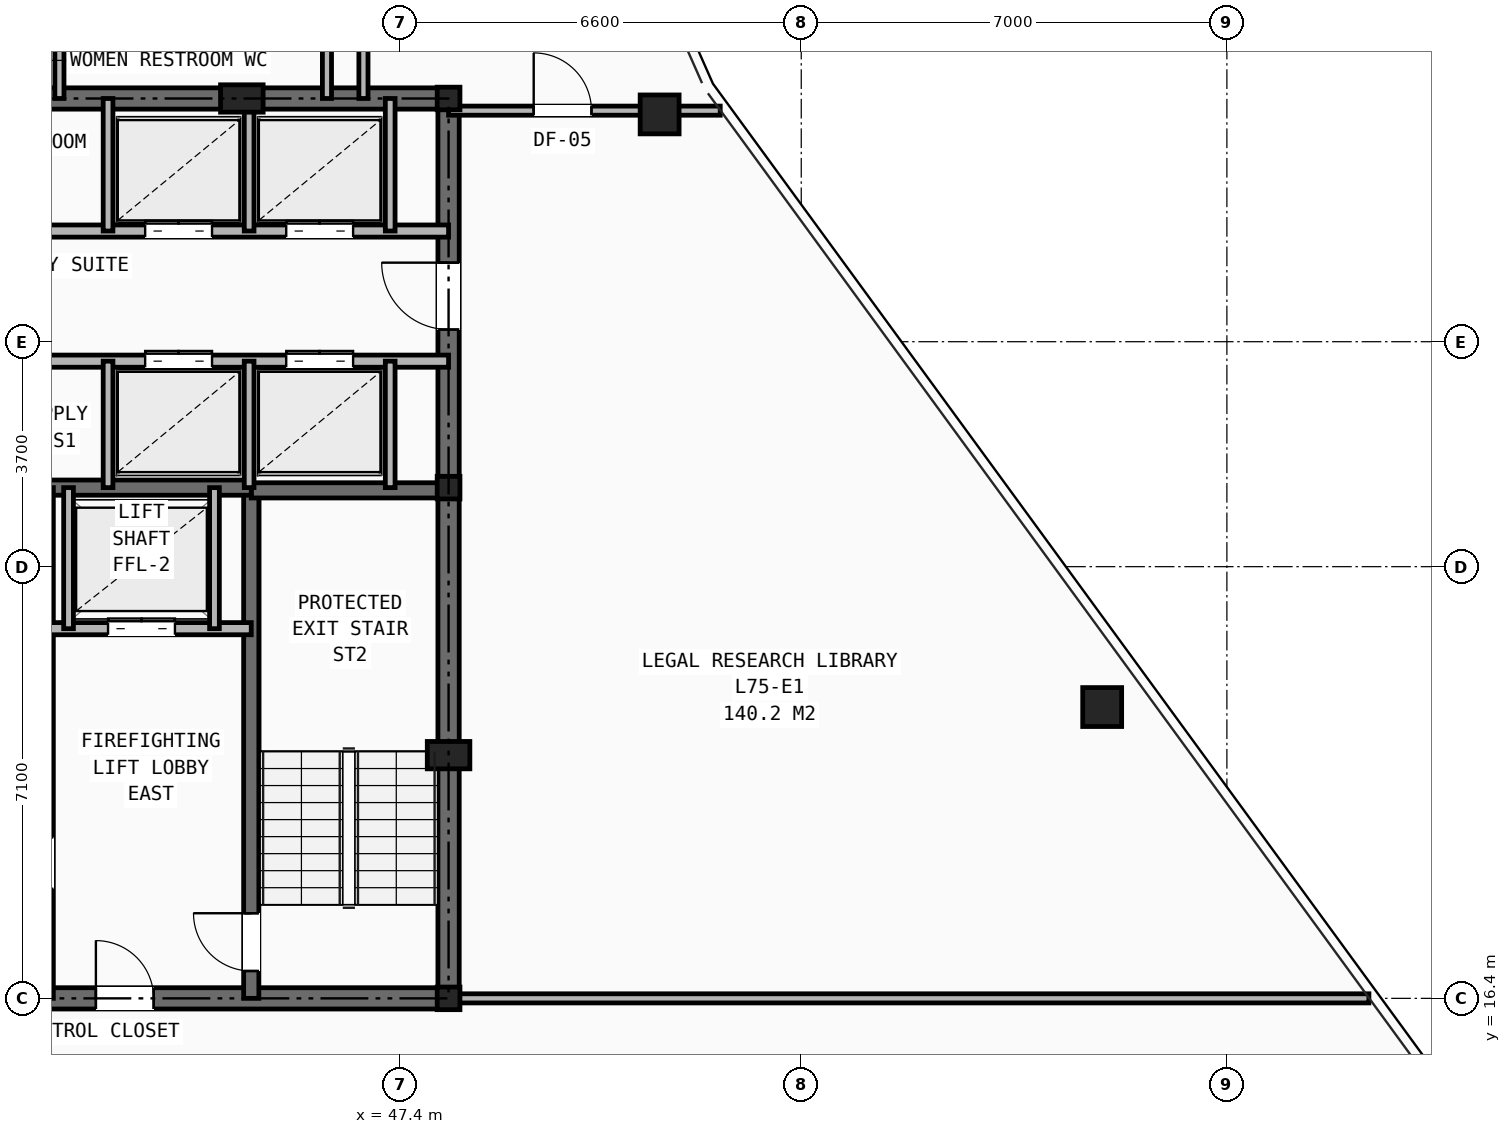
"""IFC4 building model, lengths in metres.
Left out: names, types, materials, properties, quantities, classifications, styles, units other than length and angle.
Written with IfcOpenShell. Run it as: python <this file> out.ifc"""

import sys

from ifc_helpers import new_model, si_unit, direction, frame, frame_2d, origin, origin_2d, place, context, subcontext, project, spatial, rectangle, hollow_rectangle, i_section, extrude, element, fill, save


model = new_model("IFC4")
c1 = context("Model", 3, precision=1e-05, world=origin(), true_north=direction((0.0, 1.0)))
c2 = subcontext(c1, "Body", "Model", "MODEL_VIEW")
j1 = project(units=[si_unit("LENGTHUNIT", "METRE"), si_unit("PLANEANGLEUNIT", "RADIAN")], contexts=[c1])
p1 = place(None, origin())
s1 = spatial("IfcSite", under=j1, at=p1, CompositionType="ELEMENT")
p2 = place(p1, origin())
s2 = spatial("IfcBuilding", under=s1, at=p2, CompositionType="ELEMENT")
p3 = place(p2, frame((0.0, 0.0, 265.5)))
s3 = spatial("IfcBuildingStorey", under=s2, at=p3, CompositionType="ELEMENT", Elevation=265.5)
for number, where, z_axis, x_axis in (
    (1, (48.2, 16.4, 0.0), (0.0, 0.0, 1.0), (1.0, 0.0, 0.0)),
    (2, (48.2, 24.8, 0.0), (0.0, 0.0, 1.0), (1.0, 0.0, 0.0)),
    (3, (48.2, 31.2, 0.0), (0.0, 0.0, 1.0), (1.0, 0.0, 0.0)),
):
    element("IfcColumn", number, at=place(p3, frame(where, z_axis=z_axis, x_axis=x_axis)), inside=s3, PredefinedType="COLUMN", context=c2, shape_type="SweptSolid", body=[
        extrude(i_section(OverallWidth=0.374, OverallDepth=0.372, WebThickness=0.016, FlangeThickness=0.026, at=origin_2d()), origin(), (0.0, 0.0, 1.0), 3.5),
    ])
for number, where, z_axis, x_axis in (
    (4, (48.2, 20.4, 0.0), (0.0, 0.0, 1.0), (1.0, 0.0, 0.0)),
    (5, (44.8, 31.2, 0.0), (0.0, 0.0, 1.0), (1.0, 0.0, 0.0)),
):
    element("IfcColumn", number, at=place(p3, frame(where, z_axis=z_axis, x_axis=x_axis)), inside=s3, PredefinedType="PILASTER", context=c2, shape_type="SweptSolid", body=[
        extrude(rectangle(XDim=0.7, YDim=0.45, at=origin_2d()), origin(), (0.0, 0.0, 1.0), 3.5),
    ])
for number, where, z_axis, x_axis in (
    (6, (58.949, 21.191, 0.0), (0.0, 0.0, 1.0), (1.0, 0.0, 0.0)),
    (7, (51.671, 30.938, 0.0), (0.0, 0.0, 1.0), (1.0, 0.0, 0.0)),
):
    element("IfcColumn", number, at=place(p3, frame(where, z_axis=z_axis, x_axis=x_axis)), inside=s3, PredefinedType="COLUMN", context=c2, shape_type="SweptSolid", body=[
        extrude(hollow_rectangle(XDim=0.64, YDim=0.64, WallThickness=0.045, at=origin_2d()), origin(), (0.0, 0.0, 1.0), 3.5),
    ])
p4 = place(p3, frame((31.8, 16.4, 0.0), z_axis=(0.0, 0.0, 1.0), x_axis=(1.0, 0.0, 0.0)))
e8 = element("IfcWall", 8, at=p4, inside=s3, PredefinedType="SHEAR", context=c2, shape_type="SweptSolid", body=[
    extrude(rectangle(XDim=16.4, YDim=0.35, at=frame_2d((8.2, 0.0))), origin(), (0.0, 0.0, 1.0), 3.25),
])
p5 = place(p4, frame((4.2, 0.0, 0.0)))
e9 = element("IfcOpeningElement", 9, at=p5, cuts=e8, PredefinedType="OPENING", context=c2, shape_type="SweptSolid", body=[
    extrude(rectangle(XDim=0.95, YDim=2.1, at=frame_2d((0.475, 1.05))), frame((0.0, 0.185, 0.0), z_axis=(0.0, -1.0, 0.0), x_axis=(1.0, 0.0, 0.0)), (0.0, 0.0, 1.0), 0.37),
])
p6 = place(p4, frame((10.6, 0.0, 0.0)))
e10 = element("IfcOpeningElement", 10, at=p6, cuts=e8, PredefinedType="OPENING", context=c2, shape_type="SweptSolid", body=[
    extrude(rectangle(XDim=0.95, YDim=2.1, at=frame_2d((0.475, 1.05))), frame((0.0, 0.185, 0.0), z_axis=(0.0, -1.0, 0.0), x_axis=(1.0, 0.0, 0.0)), (0.0, 0.0, 1.0), 0.37),
])
p7 = place(p3, frame((31.8, 31.2, 0.0), z_axis=(0.0, 0.0, 1.0), x_axis=(1.0, 0.0, 0.0)))
e11 = element("IfcWall", 11, at=p7, inside=s3, PredefinedType="SHEAR", context=c2, shape_type="SweptSolid", body=[
    extrude(rectangle(XDim=16.4, YDim=0.35, at=frame_2d((8.2, 0.0))), origin(), (0.0, 0.0, 1.0), 3.25),
])
p8 = place(p3, frame((48.2, 16.4, 0.0), z_axis=(0.0, 0.0, 1.0), x_axis=(0.0, 1.0, 0.0)))
e12 = element("IfcWall", 12, at=p8, inside=s3, PredefinedType="SHEAR", context=c2, shape_type="SweptSolid", body=[
    extrude(rectangle(XDim=14.8, YDim=0.35, at=frame_2d((7.4, 0.0))), origin(), (0.0, 0.0, 1.0), 3.25),
])
p9 = place(p8, frame((11.0, 0.0, 0.0)))
e13 = element("IfcOpeningElement", 13, at=p9, cuts=e12, PredefinedType="OPENING", context=c2, shape_type="SweptSolid", body=[
    extrude(rectangle(XDim=1.1, YDim=2.15, at=frame_2d((0.55, 1.075))), frame((0.0, 0.185, 0.0), z_axis=(0.0, -1.0, 0.0), x_axis=(1.0, 0.0, 0.0)), (0.0, 0.0, 1.0), 0.37),
])
p10 = place(p3, frame((44.955, 16.4, 0.0), z_axis=(0.0, 0.0, 1.0), x_axis=(0.0, 1.0, 0.0)))
e14 = element("IfcWall", 14, at=p10, inside=s3, PredefinedType="SHEAR", context=c2, shape_type="SweptSolid", body=[
    extrude(rectangle(XDim=8.4, YDim=0.25, at=frame_2d((4.2, 0.0))), origin(), (0.0, 0.0, 1.0), 3.25),
])
p11 = place(p10, frame((0.45, 0.0, 0.0)))
e15 = element("IfcOpeningElement", 15, at=p11, cuts=e14, PredefinedType="OPENING", context=c2, shape_type="SweptSolid", body=[
    extrude(rectangle(XDim=0.95, YDim=2.1, at=frame_2d((0.475, 1.05))), frame((0.0, 0.135, 0.0), z_axis=(0.0, -1.0, 0.0), x_axis=(1.0, 0.0, 0.0)), (0.0, 0.0, 1.0), 0.27),
])
p12 = place(p3, frame((44.955, 24.755, 0.0), z_axis=(0.0, 0.0, 1.0), x_axis=(1.0, 0.0, 0.0)))
e16 = element("IfcWall", 16, at=p12, inside=s3, PredefinedType="SHEAR", context=c2, shape_type="SweptSolid", body=[
    extrude(rectangle(XDim=3.245, YDim=0.25, at=frame_2d((1.623, 0.0))), origin(), (0.0, 0.0, 1.0), 3.25),
])
p13 = place(p3, frame((35.045, 24.8, 0.0), z_axis=(0.0, 0.0, 1.0), x_axis=(1.0, 0.0, 0.0)))
e17 = element("IfcWall", 17, at=p13, inside=s3, PredefinedType="SHEAR", context=c2, shape_type="SweptSolid", body=[
    extrude(rectangle(XDim=9.91, YDim=0.25, at=frame_2d((4.955, 0.0))), origin(), (0.0, 0.0, 1.0), 3.25),
])
p14 = place(p3, frame((41.61, 16.4, 0.0), z_axis=(0.0, 0.0, 1.0), x_axis=(0.0, 1.0, 0.0)))
e18 = element("IfcWall", 18, at=p14, inside=s3, PredefinedType="PARTITIONING", context=c2, shape_type="SweptSolid", body=[
    extrude(rectangle(XDim=8.4, YDim=0.18, at=frame_2d((4.2, 0.0))), origin(), (0.0, 0.0, 1.0), 2.978),
])
p15 = place(p14, frame((1.8, 0.0, 0.0)))
e19 = element("IfcOpeningElement", 19, at=p15, cuts=e18, PredefinedType="OPENING", context=c2, shape_type="SweptSolid", body=[
    extrude(rectangle(XDim=0.85, YDim=2.05, at=frame_2d((0.425, 1.025))), frame((0.0, 0.1, 0.0), z_axis=(0.0, -1.0, 0.0), x_axis=(1.0, 0.0, 0.0)), (0.0, 0.0, 1.0), 0.2),
])
p16 = place(p3, frame((35.045, 22.48, 0.0), z_axis=(0.0, 0.0, 1.0), x_axis=(1.0, 0.0, 0.0)))
e20 = element("IfcWall", 20, at=p16, inside=s3, PredefinedType="SOLIDWALL", context=c2, shape_type="SweptSolid", body=[
    extrude(rectangle(XDim=9.91, YDim=0.2, at=frame_2d((4.955, 0.0))), origin(), (0.0, 0.0, 1.0), 3.25),
])
p17 = place(p16, frame((1.255, 0.0, 0.0)))
e21 = element("IfcOpeningElement", 21, at=p17, cuts=e20, PredefinedType="OPENING", context=c2, shape_type="SweptSolid", body=[
    extrude(rectangle(XDim=1.1, YDim=2.15, at=frame_2d((0.55, 1.075))), frame((0.0, 0.11, 0.0), z_axis=(0.0, -1.0, 0.0), x_axis=(1.0, 0.0, 0.0)), (0.0, 0.0, 1.0), 0.22),
])
p18 = place(p16, frame((7.555, 0.0, 0.0)))
e22 = element("IfcOpeningElement", 22, at=p18, cuts=e20, PredefinedType="OPENING", context=c2, shape_type="SweptSolid", body=[
    extrude(rectangle(XDim=1.1, YDim=2.15, at=frame_2d((0.55, 1.075))), frame((0.0, 0.11, 0.0), z_axis=(0.0, -1.0, 0.0), x_axis=(1.0, 0.0, 0.0)), (0.0, 0.0, 1.0), 0.22),
])
p19 = place(p16, frame((4.405, 0.0, 0.0)))
e23 = element("IfcOpeningElement", 23, at=p19, cuts=e20, PredefinedType="OPENING", context=c2, shape_type="SweptSolid", body=[
    extrude(rectangle(XDim=1.1, YDim=2.15, at=frame_2d((0.55, 1.075))), frame((0.0, 0.11, 0.0), z_axis=(0.0, -1.0, 0.0), x_axis=(1.0, 0.0, 0.0)), (0.0, 0.0, 1.0), 0.22),
])
for number, where, z_axis, x_axis in (
    (24, (41.95, 22.48, 0.0), (0.0, 0.0, 1.0), (0.0, 1.0, 0.0)),
    (25, (44.35, 22.48, 0.0), (0.0, 0.0, 1.0), (0.0, 1.0, 0.0)),
):
    element("IfcWall", number, at=place(p3, frame(where, z_axis=z_axis, x_axis=x_axis)), inside=s3, PredefinedType="SOLIDWALL", context=c2, shape_type="SweptSolid", body=[
        extrude(rectangle(XDim=2.32, YDim=0.16, at=frame_2d((1.16, 0.0))), origin(), (0.0, 0.0, 1.0), 3.25),
    ])
p20 = place(p3, frame((33.82, 29.02, 0.0), z_axis=(0.0, 0.0, 1.0), x_axis=(1.0, 0.0, 0.0)))
e26 = element("IfcWall", 26, at=p20, inside=s3, PredefinedType="SOLIDWALL", context=c2, shape_type="SweptSolid", body=[
    extrude(rectangle(XDim=14.38, YDim=0.2, at=frame_2d((7.19, 0.0))), origin(), (0.0, 0.0, 1.0), 2.705),
])
p21 = place(p20, frame((3.92, 0.0, 0.0)))
e27 = element("IfcOpeningElement", 27, at=p21, cuts=e26, PredefinedType="OPENING", context=c2, shape_type="SweptSolid", body=[
    extrude(rectangle(XDim=0.9, YDim=2.1, at=frame_2d((0.45, 1.05))), frame((0.0, 0.11, 0.0), z_axis=(0.0, -1.0, 0.0), x_axis=(1.0, 0.0, 0.0)), (0.0, 0.0, 1.0), 0.22),
])
p22 = place(p20, frame((9.39, 0.0, 0.0)))
e28 = element("IfcOpeningElement", 28, at=p22, cuts=e26, PredefinedType="OPENING", context=c2, shape_type="SweptSolid", body=[
    extrude(rectangle(XDim=1.1, YDim=2.15, at=frame_2d((0.55, 1.075))), frame((0.0, 0.11, 0.0), z_axis=(0.0, -1.0, 0.0), x_axis=(1.0, 0.0, 0.0)), (0.0, 0.0, 1.0), 0.22),
])
p23 = place(p20, frame((11.71, 0.0, 0.0)))
e29 = element("IfcOpeningElement", 29, at=p23, cuts=e26, PredefinedType="OPENING", context=c2, shape_type="SweptSolid", body=[
    extrude(rectangle(XDim=1.1, YDim=2.15, at=frame_2d((0.55, 1.075))), frame((0.0, 0.11, 0.0), z_axis=(0.0, -1.0, 0.0), x_axis=(1.0, 0.0, 0.0)), (0.0, 0.0, 1.0), 0.22),
])
p24 = place(p3, frame((33.82, 26.88, 0.0), z_axis=(0.0, 0.0, 1.0), x_axis=(1.0, 0.0, 0.0)))
e30 = element("IfcWall", 30, at=p24, inside=s3, PredefinedType="SOLIDWALL", context=c2, shape_type="SweptSolid", body=[
    extrude(rectangle(XDim=14.38, YDim=0.2, at=frame_2d((7.19, 0.0))), origin(), (0.0, 0.0, 1.0), 2.705),
])
p25 = place(p24, frame((1.78, 0.0, 0.0)))
e31 = element("IfcOpeningElement", 31, at=p25, cuts=e30, PredefinedType="OPENING", context=c2, shape_type="SweptSolid", body=[
    extrude(rectangle(XDim=0.9, YDim=2.1, at=frame_2d((0.45, 1.05))), frame((0.0, 0.11, 0.0), z_axis=(0.0, -1.0, 0.0), x_axis=(1.0, 0.0, 0.0)), (0.0, 0.0, 1.0), 0.22),
])
p26 = place(p24, frame((6.07, 0.0, 0.0)))
e32 = element("IfcOpeningElement", 32, at=p26, cuts=e30, PredefinedType="OPENING", context=c2, shape_type="SweptSolid", body=[
    extrude(rectangle(XDim=0.9, YDim=2.1, at=frame_2d((0.45, 1.05))), frame((0.0, 0.11, 0.0), z_axis=(0.0, -1.0, 0.0), x_axis=(1.0, 0.0, 0.0)), (0.0, 0.0, 1.0), 0.22),
])
p27 = place(p24, frame((9.39, 0.0, 0.0)))
e33 = element("IfcOpeningElement", 33, at=p27, cuts=e30, PredefinedType="OPENING", context=c2, shape_type="SweptSolid", body=[
    extrude(rectangle(XDim=1.1, YDim=2.15, at=frame_2d((0.55, 1.075))), frame((0.0, 0.11, 0.0), z_axis=(0.0, -1.0, 0.0), x_axis=(1.0, 0.0, 0.0)), (0.0, 0.0, 1.0), 0.22),
])
p28 = place(p24, frame((11.71, 0.0, 0.0)))
e34 = element("IfcOpeningElement", 34, at=p28, cuts=e30, PredefinedType="OPENING", context=c2, shape_type="SweptSolid", body=[
    extrude(rectangle(XDim=1.1, YDim=2.15, at=frame_2d((0.55, 1.075))), frame((0.0, 0.11, 0.0), z_axis=(0.0, -1.0, 0.0), x_axis=(1.0, 0.0, 0.0)), (0.0, 0.0, 1.0), 0.22),
])
for number, where, z_axis, x_axis in (
    (35, (42.6, 29.02, 0.0), (0.0, 0.0, 1.0), (0.0, 1.0, 0.0)),
    (36, (44.92, 29.02, 0.0), (0.0, 0.0, 1.0), (0.0, 1.0, 0.0)),
    (37, (47.24, 29.02, 0.0), (0.0, 0.0, 1.0), (0.0, 1.0, 0.0)),
):
    element("IfcWall", number, at=place(p3, frame(where, z_axis=z_axis, x_axis=x_axis)), inside=s3, PredefinedType="SOLIDWALL", context=c2, shape_type="SweptSolid", body=[
        extrude(rectangle(XDim=2.18, YDim=0.16, at=frame_2d((1.09, 0.0))), origin(), (0.0, 0.0, 1.0), 2.978),
    ])
for number, where, z_axis, x_axis in (
    (38, (42.6, 24.8, 0.0), (0.0, 0.0, 1.0), (0.0, 1.0, 0.0)),
    (39, (44.92, 24.8, 0.0), (0.0, 0.0, 1.0), (0.0, 1.0, 0.0)),
    (40, (47.24, 24.8, 0.0), (0.0, 0.0, 1.0), (0.0, 1.0, 0.0)),
):
    element("IfcWall", number, at=place(p3, frame(where, z_axis=z_axis, x_axis=x_axis)), inside=s3, PredefinedType="SOLIDWALL", context=c2, shape_type="SweptSolid", body=[
        extrude(rectangle(XDim=2.08, YDim=0.16, at=frame_2d((1.04, 0.0))), origin(), (0.0, 0.0, 1.0), 3.25),
    ])
for number, where, z_axis, x_axis in (
    (41, (46.2, 31.2, 0.0), (0.0, 0.0, 1.0), (0.0, 1.0, 0.0)),
    (42, (41.8, 31.2, 0.0), (0.0, 0.0, 1.0), (0.0, 1.0, 0.0)),
):
    element("IfcWall", number, at=place(p3, frame(where, z_axis=z_axis, x_axis=x_axis)), inside=s3, PredefinedType="PARTITIONING", context=c2, shape_type="SweptSolid", body=[
        extrude(rectangle(XDim=2.6, YDim=0.15, at=frame_2d((1.3, 0.0))), origin(), (0.0, 0.0, 1.0), 2.978),
    ])
p29 = place(p3, frame((48.2, 16.4, 0.0), z_axis=(0.0, 0.0, 1.0), x_axis=(1.0, 0.0, 0.0)))
e43 = element("IfcWall", 43, at=p29, inside=s3, PredefinedType="PARTITIONING", context=c2, shape_type="SweptSolid", body=[
    extrude(rectangle(XDim=15.135, YDim=0.15, at=frame_2d((7.568, 0.0))), origin(), (0.0, 0.0, 1.0), 2.292),
])
p30 = place(p3, frame((46.8, 31.2, 0.0), z_axis=(0.0, 0.0, 1.0), x_axis=(0.0, 1.0, 0.0)))
e44 = element("IfcWall", 44, at=p30, inside=s3, PredefinedType="PARTITIONING", context=c2, shape_type="SweptSolid", body=[
    extrude(rectangle(XDim=4.5, YDim=0.15, at=frame_2d((2.25, 0.0))), origin(), (0.0, 0.0, 1.0), 2.978),
])
p31 = place(p3, frame((48.2, 31.0, 0.0), z_axis=(0.0, 0.0, 1.0), x_axis=(1.0, 0.0, 0.0)))
e45 = element("IfcWall", 45, at=p31, inside=s3, PredefinedType="PARTITIONING", context=c2, shape_type="SweptSolid", body=[
    extrude(rectangle(XDim=4.468, YDim=0.15, at=frame_2d((2.234, 0.0))), origin(), (0.0, 0.0, 1.0), 2.292),
])
p32 = place(p31, frame((1.4, 0.0, 0.0)))
e46 = element("IfcOpeningElement", 46, at=p32, cuts=e45, PredefinedType="OPENING", context=c2, shape_type="SweptSolid", body=[
    extrude(rectangle(XDim=0.95, YDim=2.1, at=frame_2d((0.475, 1.05))), frame((0.0, 0.085, 0.0), z_axis=(0.0, -1.0, 0.0), x_axis=(1.0, 0.0, 0.0)), (0.0, 0.0, 1.0), 0.17),
])
p33 = place(p11, origin())
e47 = element("IfcDoor", 47, at=p33, inside=s3, OperationType="SINGLE_SWING_RIGHT", PredefinedType="DOOR", context=c2, shape_type="SweptSolid", body=[
    extrude(rectangle(XDim=0.95, YDim=2.1, at=frame_2d((0.475, 1.05))), frame((0.0, 0.025, 0.0), z_axis=(0.0, -1.0, 0.0), x_axis=(1.0, 0.0, 0.0)), (0.0, 0.0, 1.0), 0.05),
])
fill(e15, e47)
p34 = place(p6, origin())
e48 = element("IfcDoor", 48, at=p34, inside=s3, OperationType="SINGLE_SWING_LEFT", PredefinedType="DOOR", context=c2, shape_type="SweptSolid", body=[
    extrude(rectangle(XDim=0.95, YDim=2.1, at=frame_2d((0.475, 1.05))), frame((0.0, 0.025, 0.0), z_axis=(0.0, -1.0, 0.0), x_axis=(1.0, 0.0, 0.0)), (0.0, 0.0, 1.0), 0.05),
])
fill(e10, e48)
p35 = place(p18, origin())
e49 = element("IfcDoor", 49, at=p35, inside=s3, OperationType="DOUBLE_DOOR_SLIDING", PredefinedType="DOOR", context=c2, shape_type="SweptSolid", body=[
    extrude(rectangle(XDim=1.1, YDim=2.15, at=frame_2d((0.55, 1.075))), frame((0.0, 0.025, 0.0), z_axis=(0.0, -1.0, 0.0), x_axis=(1.0, 0.0, 0.0)), (0.0, 0.0, 1.0), 0.05),
])
fill(e22, e49)
p36 = place(p9, origin())
e50 = element("IfcDoor", 50, at=p36, inside=s3, OperationType="SINGLE_SWING_RIGHT", PredefinedType="DOOR", context=c2, shape_type="SweptSolid", body=[
    extrude(rectangle(XDim=1.1, YDim=2.15, at=frame_2d((0.55, 1.075))), frame((0.0, 0.025, 0.0), z_axis=(0.0, -1.0, 0.0), x_axis=(1.0, 0.0, 0.0)), (0.0, 0.0, 1.0), 0.05),
])
fill(e13, e50)
p37 = place(p22, origin())
e51 = element("IfcDoor", 51, at=p37, inside=s3, OperationType="DOUBLE_DOOR_SLIDING", PredefinedType="DOOR", context=c2, shape_type="SweptSolid", body=[
    extrude(rectangle(XDim=1.1, YDim=2.15, at=frame_2d((0.55, 1.075))), frame((0.0, 0.025, 0.0), z_axis=(0.0, -1.0, 0.0), x_axis=(1.0, 0.0, 0.0)), (0.0, 0.0, 1.0), 0.05),
])
fill(e28, e51)
p38 = place(p23, origin())
e52 = element("IfcDoor", 52, at=p38, inside=s3, OperationType="DOUBLE_DOOR_SLIDING", PredefinedType="DOOR", context=c2, shape_type="SweptSolid", body=[
    extrude(rectangle(XDim=1.1, YDim=2.15, at=frame_2d((0.55, 1.075))), frame((0.0, 0.025, 0.0), z_axis=(0.0, -1.0, 0.0), x_axis=(1.0, 0.0, 0.0)), (0.0, 0.0, 1.0), 0.05),
])
fill(e29, e52)
p39 = place(p27, origin())
e53 = element("IfcDoor", 53, at=p39, inside=s3, OperationType="DOUBLE_DOOR_SLIDING", PredefinedType="DOOR", context=c2, shape_type="SweptSolid", body=[
    extrude(rectangle(XDim=1.1, YDim=2.15, at=frame_2d((0.55, 1.075))), frame((0.0, 0.025, 0.0), z_axis=(0.0, -1.0, 0.0), x_axis=(1.0, 0.0, 0.0)), (0.0, 0.0, 1.0), 0.05),
])
fill(e33, e53)
p40 = place(p28, origin())
e54 = element("IfcDoor", 54, at=p40, inside=s3, OperationType="DOUBLE_DOOR_SLIDING", PredefinedType="DOOR", context=c2, shape_type="SweptSolid", body=[
    extrude(rectangle(XDim=1.1, YDim=2.15, at=frame_2d((0.55, 1.075))), frame((0.0, 0.025, 0.0), z_axis=(0.0, -1.0, 0.0), x_axis=(1.0, 0.0, 0.0)), (0.0, 0.0, 1.0), 0.05),
])
fill(e34, e54)
p41 = place(p32, origin())
e55 = element("IfcDoor", 55, at=p41, inside=s3, OperationType="SINGLE_SWING_LEFT", PredefinedType="DOOR", context=c2, shape_type="SweptSolid", body=[
    extrude(rectangle(XDim=0.95, YDim=2.1, at=frame_2d((0.475, 1.05))), frame((0.0, 0.025, 0.0), z_axis=(0.0, -1.0, 0.0), x_axis=(1.0, 0.0, 0.0)), (0.0, 0.0, 1.0), 0.05),
])
fill(e46, e55)
save(model, sys.argv[1])
